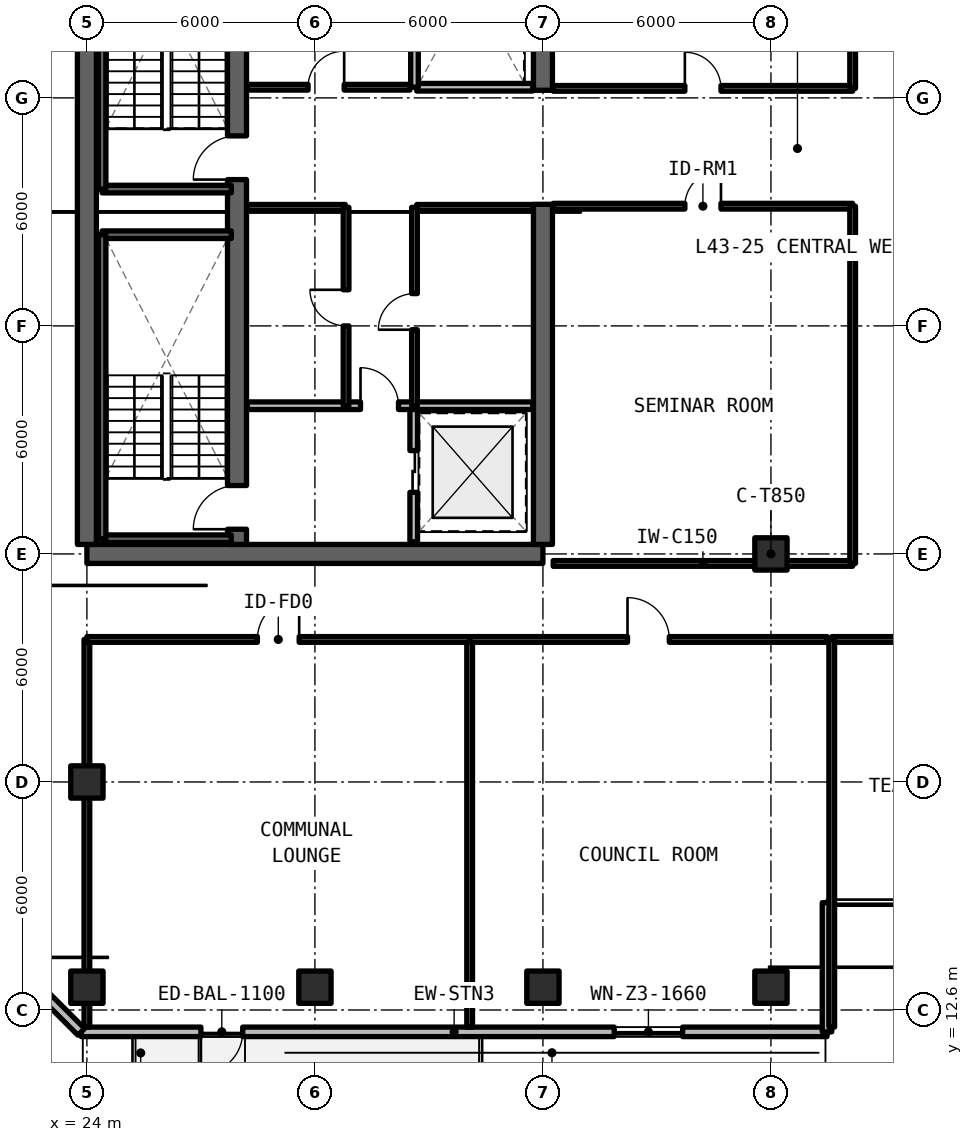
"""IFC4 building model, lengths in metres.
Left out: names, types, materials, properties, quantities, classifications, styles, units other than length and angle.
Written with IfcOpenShell. Run it as: python <this file> out.ifc"""

import sys

from ifc_helpers import new_model, si_unit, direction, frame, frame_2d, origin, origin_2d, place, context, subcontext, project, spatial, rectangle, extrude, element, fill, save


model = new_model("IFC4")
c1 = context("Model", 3, precision=1e-05, world=origin(), true_north=direction((0.0, 1.0)))
c2 = subcontext(c1, "Body", "Model", "MODEL_VIEW")
j1 = project(units=[si_unit("LENGTHUNIT", "METRE"), si_unit("PLANEANGLEUNIT", "RADIAN")], contexts=[c1])
p1 = place(None, origin())
s1 = spatial("IfcSite", under=j1, at=p1, CompositionType="ELEMENT")
p2 = place(p1, origin())
s2 = spatial("IfcBuilding", under=s1, at=p2, CompositionType="ELEMENT")
p3 = place(p2, frame((0.0, 0.0, 155.1)))
s3 = spatial("IfcBuildingStorey", under=s2, at=p3, CompositionType="ELEMENT", Elevation=155.1)
p4 = place(p3, frame((24.0, 24.6, 0.0), z_axis=(0.0, 0.0, 1.0), x_axis=(1.0, 0.0, 0.0)))
e1 = element("IfcWall", 1, at=p4, inside=s3, PredefinedType="SHEAR", context=c2, shape_type="SweptSolid", body=[
    extrude(rectangle(XDim=12.0, YDim=0.5, at=frame_2d((6.0, 0.0))), origin(), (0.0, 0.0, 1.0), 3.3),
])
p5 = place(p3, frame((24.0, 24.85, 0.0), z_axis=(0.0, 0.0, 1.0), x_axis=(0.0, 1.0, 0.0)))
e2 = element("IfcWall", 2, at=p5, inside=s3, PredefinedType="SHEAR", context=c2, shape_type="SweptSolid", body=[
    extrude(rectangle(XDim=17.5, YDim=0.5, at=frame_2d((8.75, 0.0))), origin(), (0.0, 0.0, 1.0), 3.3),
])
p6 = place(p3, frame((36.0, 24.85, 0.0), z_axis=(0.0, 0.0, 1.0), x_axis=(0.0, 1.0, 0.0)))
e3 = element("IfcWall", 3, at=p6, inside=s3, PredefinedType="SHEAR", context=c2, shape_type="SweptSolid", body=[
    extrude(rectangle(XDim=8.95, YDim=0.5, at=frame_2d((4.475, 0.0))), origin(), (0.0, 0.0, 1.0), 3.3),
])
p7 = place(p3, frame((36.0, 36.8, 0.0), z_axis=(0.0, 0.0, 1.0), x_axis=(0.0, 1.0, 0.0)))
e4 = element("IfcWall", 4, at=p7, inside=s3, PredefinedType="SHEAR", context=c2, shape_type="SweptSolid", body=[
    extrude(rectangle(XDim=5.55, YDim=0.5, at=frame_2d((2.775, 0.0))), origin(), (0.0, 0.0, 1.0), 3.3),
])
p8 = place(p3, frame((27.95, 24.85, 0.0), z_axis=(0.0, 0.0, 1.0), x_axis=(0.0, 1.0, 0.0)))
e5 = element("IfcWall", 5, at=p8, inside=s3, PredefinedType="SHEAR", context=c2, shape_type="SweptSolid", body=[
    extrude(rectangle(XDim=17.5, YDim=0.5, at=frame_2d((8.75, 0.0))), origin(), (0.0, 0.0, 1.0), 3.3),
])
p9 = place(p8, frame((0.4, 0.0, 0.0)))
e6 = element("IfcOpeningElement", 6, at=p9, cuts=e5, PredefinedType="OPENING", context=c2, shape_type="SweptSolid", body=[
    extrude(rectangle(XDim=1.15, YDim=2.15, at=frame_2d((0.575, 1.075))), frame((0.0, 0.26, 0.0), z_axis=(0.0, -1.0, 0.0), x_axis=(1.0, 0.0, 0.0)), (0.0, 0.0, 1.0), 0.52),
])
p10 = place(p8, frame((9.6, 0.0, 0.0)))
e7 = element("IfcOpeningElement", 7, at=p10, cuts=e5, PredefinedType="OPENING", context=c2, shape_type="SweptSolid", body=[
    extrude(rectangle(XDim=1.15, YDim=2.15, at=frame_2d((0.575, 1.075))), frame((0.0, 0.26, 0.0), z_axis=(0.0, -1.0, 0.0), x_axis=(1.0, 0.0, 0.0)), (0.0, 0.0, 1.0), 0.52),
])
for number, where, z_axis, x_axis in (
    (8, (42.0, 24.6, 0.0), (0.0, 0.0, 1.0), (1.0, 0.0, 0.0)),
    (9, (24.0, 18.6, 0.0), (0.0, 0.0, 1.0), (1.0, 0.0, 0.0)),
    (10, (24.0, 13.2, 0.0), (0.0, 0.0, 1.0), (1.0, 0.0, 0.0)),
    (11, (30.0, 13.2, 0.0), (0.0, 0.0, 1.0), (1.0, 0.0, 0.0)),
    (12, (36.0, 13.2, 0.0), (0.0, 0.0, 1.0), (1.0, 0.0, 0.0)),
    (13, (42.0, 13.2, 0.0), (0.0, 0.0, 1.0), (1.0, 0.0, 0.0)),
):
    element("IfcColumn", number, at=place(p3, frame(where, z_axis=z_axis, x_axis=x_axis)), inside=s3, PredefinedType="COLUMN", context=c2, shape_type="SweptSolid", body=[
        extrude(rectangle(XDim=0.85, YDim=0.85, at=origin_2d()), origin(), (0.0, 0.0, 1.0), 3.3),
    ])
p11 = place(p3, frame((23.852, 12.025, 0.0), z_axis=(0.0, 0.0, 1.0), x_axis=(1.0, 0.0, 0.0)))
e14 = element("IfcWall", 14, at=p11, inside=s3, PredefinedType="SOLIDWALL", context=c2, shape_type="SweptSolid", body=[
    extrude(rectangle(XDim=19.623, YDim=0.25, at=frame_2d((9.812, 0.0))), origin(), (0.0, 0.0, 1.0), 3.08),
])
p12 = place(p11, frame((3.148, 0.0, 0.0)))
e15 = element("IfcOpeningElement", 15, at=p12, cuts=e14, PredefinedType="OPENING", context=c2, shape_type="SweptSolid", body=[
    extrude(rectangle(XDim=1.1, YDim=2.15, at=frame_2d((0.55, 1.075))), frame((0.0, 0.135, 0.0), z_axis=(0.0, -1.0, 0.0), x_axis=(1.0, 0.0, 0.0)), (0.0, 0.0, 1.0), 0.27),
])
p13 = place(p11, frame((14.024, 0.0, 0.78)))
e16 = element("IfcOpeningElement", 16, at=p13, cuts=e14, PredefinedType="OPENING", context=c2, shape_type="SweptSolid", body=[
    extrude(rectangle(XDim=1.8, YDim=1.66, at=frame_2d((0.9, 0.83))), frame((0.0, 0.135, 0.0), z_axis=(0.0, -1.0, 0.0), x_axis=(1.0, 0.0, 0.0)), (0.0, 0.0, 1.0), 0.27),
])
p14 = place(p3, frame((43.475, 12.025, 0.0), z_axis=(0.0, 0.0, 1.0), x_axis=(0.0, 1.0, 0.0)))
e17 = element("IfcWall", 17, at=p14, inside=s3, PredefinedType="SOLIDWALL", context=c2, shape_type="SweptSolid", body=[
    extrude(rectangle(XDim=3.4, YDim=0.25, at=frame_2d((1.7, 0.0))), origin(), (0.0, 0.0, 1.0), 3.08),
])
p15 = place(p3, frame((19.725, 16.152, 0.0), z_axis=(0.0, 0.0, 1.0), x_axis=(0.70708586489, -0.707127696864, 0.0)))
e18 = element("IfcWall", 18, at=p15, inside=s3, PredefinedType="SOLIDWALL", context=c2, shape_type="SweptSolid", body=[
    extrude(rectangle(XDim=5.836, YDim=0.25, at=frame_2d((2.918, 0.0))), origin(), (0.0, 0.0, 1.0), 3.08),
])
p16 = place(p15, frame((0.898, 0.0, 0.78)))
e19 = element("IfcOpeningElement", 19, at=p16, cuts=e18, PredefinedType="OPENING", context=c2, shape_type="SweptSolid", body=[
    extrude(rectangle(XDim=3.4, YDim=1.66, at=frame_2d((1.7, 0.83))), frame((0.0, 0.135, 0.0), z_axis=(0.0, -1.0, 0.0), x_axis=(1.0, 0.0, 0.0)), (0.0, 0.0, 1.0), 0.27),
])
p17 = place(p3, frame((32.6, 24.92, 0.0), z_axis=(0.0, 0.0, 1.0), x_axis=(0.0, 1.0, 0.0)))
e20 = element("IfcWall", 20, at=p17, inside=s3, PredefinedType="SOLIDWALL", context=c2, shape_type="SweptSolid", body=[
    extrude(rectangle(XDim=3.58, YDim=0.2, at=frame_2d((1.79, 0.0))), origin(), (0.0, 0.0, 1.0), 2.35),
])
p18 = place(p17, frame((1.3, 0.0, 0.0)))
e21 = element("IfcOpeningElement", 21, at=p18, cuts=e20, PredefinedType="OPENING", context=c2, shape_type="SweptSolid", body=[
    extrude(rectangle(XDim=1.1, YDim=2.2, at=frame_2d((0.55, 1.1))), frame((0.0, 0.11, 0.0), z_axis=(0.0, -1.0, 0.0), x_axis=(1.0, 0.0, 0.0)), (0.0, 0.0, 1.0), 0.22),
])
p19 = place(p3, frame((28.22, 28.5, 0.0), z_axis=(0.0, 0.0, 1.0), x_axis=(1.0, 0.0, 0.0)))
e22 = element("IfcWall", 22, at=p19, inside=s3, PredefinedType="SOLIDWALL", context=c2, shape_type="SweptSolid", body=[
    extrude(rectangle(XDim=7.51, YDim=0.2, at=frame_2d((3.755, 0.0))), origin(), (0.0, 0.0, 1.0), 2.35),
])
p20 = place(p19, frame((2.98, 0.0, 0.0)))
e23 = element("IfcOpeningElement", 23, at=p20, cuts=e22, PredefinedType="OPENING", context=c2, shape_type="SweptSolid", body=[
    extrude(rectangle(XDim=1.0, YDim=2.15, at=frame_2d((0.5, 1.075))), frame((0.0, 0.11, 0.0), z_axis=(0.0, -1.0, 0.0), x_axis=(1.0, 0.0, 0.0)), (0.0, 0.0, 1.0), 0.22),
])
p21 = place(p3, frame((28.22, 33.72, 0.0), z_axis=(0.0, 0.0, 1.0), x_axis=(1.0, 0.0, 0.0)))
e24 = element("IfcWall", 24, at=p21, inside=s3, PredefinedType="SOLIDWALL", context=c2, shape_type="SweptSolid", body=[
    extrude(rectangle(XDim=2.58, YDim=0.15, at=frame_2d((1.29, 0.0))), origin(), (0.0, 0.0, 1.0), 2.35),
])
p22 = place(p3, frame((30.82, 28.5, 0.0), z_axis=(0.0, 0.0, 1.0), x_axis=(0.0, 1.0, 0.0)))
e25 = element("IfcWall", 25, at=p22, inside=s3, PredefinedType="SOLIDWALL", context=c2, shape_type="SweptSolid", body=[
    extrude(rectangle(XDim=5.22, YDim=0.15, at=frame_2d((2.61, 0.0))), origin(), (0.0, 0.0, 1.0), 2.35),
])
p23 = place(p22, frame((2.1, 0.0, 0.0)))
e26 = element("IfcOpeningElement", 26, at=p23, cuts=e25, PredefinedType="OPENING", context=c2, shape_type="SweptSolid", body=[
    extrude(rectangle(XDim=0.95, YDim=2.15, at=frame_2d((0.475, 1.075))), frame((0.0, 0.085, 0.0), z_axis=(0.0, -1.0, 0.0), x_axis=(1.0, 0.0, 0.0)), (0.0, 0.0, 1.0), 0.17),
])
p24 = place(p3, frame((32.68, 33.72, 0.0), z_axis=(0.0, 0.0, 1.0), x_axis=(1.0, 0.0, 0.0)))
e27 = element("IfcWall", 27, at=p24, inside=s3, PredefinedType="SOLIDWALL", context=c2, shape_type="SweptSolid", body=[
    extrude(rectangle(XDim=3.05, YDim=0.15, at=frame_2d((1.525, 0.0))), origin(), (0.0, 0.0, 1.0), 2.35),
])
p25 = place(p3, frame((32.62, 28.5, 0.0), z_axis=(0.0, 0.0, 1.0), x_axis=(0.0, 1.0, 0.0)))
e28 = element("IfcWall", 28, at=p25, inside=s3, PredefinedType="SOLIDWALL", context=c2, shape_type="SweptSolid", body=[
    extrude(rectangle(XDim=5.22, YDim=0.15, at=frame_2d((2.61, 0.0))), origin(), (0.0, 0.0, 1.0), 2.35),
])
p26 = place(p25, frame((2.0, 0.0, 0.0)))
e29 = element("IfcOpeningElement", 29, at=p26, cuts=e28, PredefinedType="OPENING", context=c2, shape_type="SweptSolid", body=[
    extrude(rectangle(XDim=0.95, YDim=2.15, at=frame_2d((0.475, 1.075))), frame((0.0, 0.085, 0.0), z_axis=(0.0, -1.0, 0.0), x_axis=(1.0, 0.0, 0.0)), (0.0, 0.0, 1.0), 0.17),
])
p27 = place(p3, frame((28.22, 36.88, 0.0), z_axis=(0.0, 0.0, 1.0), x_axis=(1.0, 0.0, 0.0)))
e30 = element("IfcWall", 30, at=p27, inside=s3, PredefinedType="SOLIDWALL", context=c2, shape_type="SweptSolid", body=[
    extrude(rectangle(XDim=4.28, YDim=0.15, at=frame_2d((2.14, 0.0))), origin(), (0.0, 0.0, 1.0), 2.35),
])
p28 = place(p27, frame((1.6, 0.0, 0.0)))
e31 = element("IfcOpeningElement", 31, at=p28, cuts=e30, PredefinedType="OPENING", context=c2, shape_type="SweptSolid", body=[
    extrude(rectangle(XDim=0.95, YDim=2.15, at=frame_2d((0.475, 1.075))), frame((0.0, 0.085, 0.0), z_axis=(0.0, -1.0, 0.0), x_axis=(1.0, 0.0, 0.0)), (0.0, 0.0, 1.0), 0.17),
])
p29 = place(p3, frame((32.68, 36.88, 0.0), z_axis=(0.0, 0.0, 1.0), x_axis=(1.0, 0.0, 0.0)))
e32 = element("IfcWall", 32, at=p29, inside=s3, PredefinedType="SOLIDWALL", context=c2, shape_type="SweptSolid", body=[
    extrude(rectangle(XDim=3.05, YDim=0.2, at=frame_2d((1.525, 0.0))), origin(), (0.0, 0.0, 1.0), 2.35),
])
p30 = place(p3, frame((32.62, 36.88, 0.0), z_axis=(0.0, 0.0, 1.0), x_axis=(0.0, 1.0, 0.0)))
e33 = element("IfcWall", 33, at=p30, inside=s3, PredefinedType="SOLIDWALL", context=c2, shape_type="SweptSolid", body=[
    extrude(rectangle(XDim=5.42, YDim=0.2, at=frame_2d((2.71, 0.0))), origin(), (0.0, 0.0, 1.0), 2.35),
])
p31 = place(p3, frame((36.27, 24.35, 0.0), z_axis=(0.0, 0.0, 1.0), x_axis=(1.0, 0.0, 0.0)))
e34 = element("IfcWall", 34, at=p31, inside=s3, PredefinedType="SOLIDWALL", context=c2, shape_type="SweptSolid", body=[
    extrude(rectangle(XDim=7.88, YDim=0.15, at=frame_2d((3.94, 0.0))), origin(), (0.0, 0.0, 1.0), 2.35),
])
p32 = place(p3, frame((36.27, 33.75, 0.0), z_axis=(0.0, 0.0, 1.0), x_axis=(1.0, 0.0, 0.0)))
e35 = element("IfcWall", 35, at=p32, inside=s3, PredefinedType="SOLIDWALL", context=c2, shape_type="SweptSolid", body=[
    extrude(rectangle(XDim=7.88, YDim=0.15, at=frame_2d((3.94, 0.0))), origin(), (0.0, 0.0, 1.0), 2.35),
])
p33 = place(p32, frame((3.465, 0.0, 0.0)))
e36 = element("IfcOpeningElement", 36, at=p33, cuts=e35, PredefinedType="OPENING", context=c2, shape_type="SweptSolid", body=[
    extrude(rectangle(XDim=0.95, YDim=2.15, at=frame_2d((0.475, 1.075))), frame((0.0, 0.085, 0.0), z_axis=(0.0, -1.0, 0.0), x_axis=(1.0, 0.0, 0.0)), (0.0, 0.0, 1.0), 0.17),
])
p34 = place(p3, frame((44.15, 24.35, 0.0), z_axis=(0.0, 0.0, 1.0), x_axis=(0.0, 1.0, 0.0)))
e37 = element("IfcWall", 37, at=p34, inside=s3, PredefinedType="SOLIDWALL", context=c2, shape_type="SweptSolid", body=[
    extrude(rectangle(XDim=9.4, YDim=0.15, at=frame_2d((4.7, 0.0))), origin(), (0.0, 0.0, 1.0), 2.35),
])
p35 = place(p3, frame((36.27, 36.85, 0.0), z_axis=(0.0, 0.0, 1.0), x_axis=(1.0, 0.0, 0.0)))
e38 = element("IfcWall", 38, at=p35, inside=s3, PredefinedType="SOLIDWALL", context=c2, shape_type="SweptSolid", body=[
    extrude(rectangle(XDim=7.88, YDim=0.15, at=frame_2d((3.94, 0.0))), origin(), (0.0, 0.0, 1.0), 2.35),
])
p36 = place(p35, frame((3.465, 0.0, 0.0)))
e39 = element("IfcOpeningElement", 39, at=p36, cuts=e38, PredefinedType="OPENING", context=c2, shape_type="SweptSolid", body=[
    extrude(rectangle(XDim=0.95, YDim=2.15, at=frame_2d((0.475, 1.075))), frame((0.0, 0.085, 0.0), z_axis=(0.0, -1.0, 0.0), x_axis=(1.0, 0.0, 0.0)), (0.0, 0.0, 1.0), 0.17),
])
p37 = place(p3, frame((44.15, 36.85, 0.0), z_axis=(0.0, 0.0, 1.0), x_axis=(0.0, 1.0, 0.0)))
e40 = element("IfcWall", 40, at=p37, inside=s3, PredefinedType="SOLIDWALL", context=c2, shape_type="SweptSolid", body=[
    extrude(rectangle(XDim=6.0, YDim=0.15, at=frame_2d((3.0, 0.0))), origin(), (0.0, 0.0, 1.0), 2.35),
])
p38 = place(p3, frame((43.6, 22.35, 0.0), z_axis=(0.0, 0.0, 1.0), x_axis=(1.0, 0.0, 0.0)))
e41 = element("IfcWall", 41, at=p38, inside=s3, PredefinedType="SOLIDWALL", context=c2, shape_type="SweptSolid", body=[
    extrude(rectangle(XDim=8.4, YDim=0.15, at=frame_2d((4.2, 0.0))), origin(), (0.0, 0.0, 1.0), 2.35),
])
p39 = place(p38, frame((3.65, 0.0, 0.0)))
e42 = element("IfcOpeningElement", 42, at=p39, cuts=e41, PredefinedType="OPENING", context=c2, shape_type="SweptSolid", body=[
    extrude(rectangle(XDim=1.1, YDim=2.15, at=frame_2d((0.55, 1.075))), frame((0.0, 0.085, 0.0), z_axis=(0.0, -1.0, 0.0), x_axis=(1.0, 0.0, 0.0)), (0.0, 0.0, 1.0), 0.17),
])
for number, where, z_axis, x_axis in (
    (43, (43.6, 12.15, 0.0), (0.0, 0.0, 1.0), (0.0, 1.0, 0.0)),
    (44, (24.0, 12.15, 0.0), (0.0, 0.0, 1.0), (0.0, 1.0, 0.0)),
    (45, (34.072, 12.15, 0.0), (0.0, 0.0, 1.0), (0.0, 1.0, 0.0)),
):
    element("IfcWall", number, at=place(p3, frame(where, z_axis=z_axis, x_axis=x_axis)), inside=s3, PredefinedType="SOLIDWALL", context=c2, shape_type="SweptSolid", body=[
        extrude(rectangle(XDim=10.2, YDim=0.15, at=frame_2d((5.1, 0.0))), origin(), (0.0, 0.0, 1.0), 2.35),
    ])
p40 = place(p3, frame((24.0, 22.35, 0.0), z_axis=(0.0, 0.0, 1.0), x_axis=(1.0, 0.0, 0.0)))
e46 = element("IfcWall", 46, at=p40, inside=s3, PredefinedType="SOLIDWALL", context=c2, shape_type="SweptSolid", body=[
    extrude(rectangle(XDim=10.072, YDim=0.15, at=frame_2d((5.036, 0.0))), origin(), (0.0, 0.0, 1.0), 2.35),
])
p41 = place(p40, frame((4.486, 0.0, 0.0)))
e47 = element("IfcOpeningElement", 47, at=p41, cuts=e46, PredefinedType="OPENING", context=c2, shape_type="SweptSolid", body=[
    extrude(rectangle(XDim=1.1, YDim=2.15, at=frame_2d((0.55, 1.075))), frame((0.0, 0.085, 0.0), z_axis=(0.0, -1.0, 0.0), x_axis=(1.0, 0.0, 0.0)), (0.0, 0.0, 1.0), 0.17),
])
p42 = place(p3, frame((34.072, 22.35, 0.0), z_axis=(0.0, 0.0, 1.0), x_axis=(1.0, 0.0, 0.0)))
e48 = element("IfcWall", 48, at=p42, inside=s3, PredefinedType="SOLIDWALL", context=c2, shape_type="SweptSolid", body=[
    extrude(rectangle(XDim=9.408, YDim=0.15, at=frame_2d((4.704, 0.0))), origin(), (0.0, 0.0, 1.0), 2.35),
])
p43 = place(p42, frame((4.154, 0.0, 0.0)))
e49 = element("IfcOpeningElement", 49, at=p43, cuts=e48, PredefinedType="OPENING", context=c2, shape_type="SweptSolid", body=[
    extrude(rectangle(XDim=1.1, YDim=2.15, at=frame_2d((0.55, 1.075))), frame((0.0, 0.085, 0.0), z_axis=(0.0, -1.0, 0.0), x_axis=(1.0, 0.0, 0.0)), (0.0, 0.0, 1.0), 0.17),
])
for number, where, z_axis, x_axis in (
    (50, (24.4, 25.0, 0.0), (0.0, 0.0, 1.0), (1.0, 0.0, 0.0)),
    (51, (27.8, 33.0, 0.0), (0.0, 0.0, 1.0), (-1.0, 0.0, 0.0)),
):
    element("IfcWall", number, at=place(p3, frame(where, z_axis=z_axis, x_axis=x_axis)), inside=s3, PredefinedType="SOLIDWALL", context=c2, shape_type="SweptSolid", body=[
        extrude(rectangle(XDim=3.4, YDim=0.2, at=frame_2d((1.7, 0.0))), origin(), (0.0, 0.0, 1.0), 3.3),
    ])
p44 = place(p3, frame((24.4, 33.0, 0.0), z_axis=(0.0, 0.0, 1.0), x_axis=(0.0, -1.0, 0.0)))
e52 = element("IfcWall", 52, at=p44, inside=s3, PredefinedType="SOLIDWALL", context=c2, shape_type="SweptSolid", body=[
    extrude(rectangle(XDim=8.0, YDim=0.2, at=frame_2d((4.0, 0.0))), origin(), (0.0, 0.0, 1.0), 3.3),
])
p45 = place(p3, frame((24.4, 34.2, 0.0), z_axis=(0.0, 0.0, 1.0), x_axis=(1.0, 0.0, 0.0)))
e53 = element("IfcWall", 53, at=p45, inside=s3, PredefinedType="SOLIDWALL", context=c2, shape_type="SweptSolid", body=[
    extrude(rectangle(XDim=3.4, YDim=0.2, at=frame_2d((1.7, 0.0))), origin(), (0.0, 0.0, 1.0), 3.3),
])
p46 = place(p3, frame((24.4, 42.2, 0.0), z_axis=(0.0, 0.0, 1.0), x_axis=(0.0, -1.0, 0.0)))
e54 = element("IfcWall", 54, at=p46, inside=s3, PredefinedType="SOLIDWALL", context=c2, shape_type="SweptSolid", body=[
    extrude(rectangle(XDim=8.0, YDim=0.2, at=frame_2d((4.0, 0.0))), origin(), (0.0, 0.0, 1.0), 3.3),
])
p47 = place(p12, frame((1.1, 0.0, 0.0), z_axis=(0.0, 0.0, 1.0), x_axis=(-1.0, 0.0, 0.0)))
e55 = element("IfcDoor", 55, at=p47, inside=s3, OperationType="SINGLE_SWING_RIGHT", PredefinedType="DOOR", context=c2, shape_type="SweptSolid", body=[
    extrude(rectangle(XDim=1.1, YDim=2.15, at=frame_2d((0.55, 1.075))), frame((0.0, 0.025, 0.0), z_axis=(0.0, -1.0, 0.0), x_axis=(1.0, 0.0, 0.0)), (0.0, 0.0, 1.0), 0.05),
])
fill(e15, e55)
p48 = place(p13, origin())
e56 = element("IfcWindow", 56, at=p48, inside=s3, PartitioningType="SINGLE_PANEL", PredefinedType="WINDOW", context=c2, shape_type="SweptSolid", body=[
    extrude(rectangle(XDim=1.8, YDim=1.66, at=frame_2d((0.9, 0.83))), frame((0.0, 0.03, 0.0), z_axis=(0.0, -1.0, 0.0), x_axis=(1.0, 0.0, 0.0)), (0.0, 0.0, 1.0), 0.06),
])
fill(e16, e56)
p49 = place(p18, origin())
e57 = element("IfcDoor", 57, at=p49, inside=s3, OperationType="SLIDING_TO_LEFT", PredefinedType="DOOR", context=c2, shape_type="SweptSolid", body=[
    extrude(rectangle(XDim=1.1, YDim=2.2, at=frame_2d((0.55, 1.1))), frame((0.0, 0.025, 0.0), z_axis=(0.0, -1.0, 0.0), x_axis=(1.0, 0.0, 0.0)), (0.0, 0.0, 1.0), 0.05),
])
fill(e21, e57)
p50 = place(p20, origin())
e58 = element("IfcDoor", 58, at=p50, inside=s3, OperationType="SINGLE_SWING_LEFT", PredefinedType="DOOR", context=c2, shape_type="SweptSolid", body=[
    extrude(rectangle(XDim=1.0, YDim=2.15, at=frame_2d((0.5, 1.075))), frame((0.0, 0.025, 0.0), z_axis=(0.0, -1.0, 0.0), x_axis=(1.0, 0.0, 0.0)), (0.0, 0.0, 1.0), 0.05),
])
fill(e23, e58)
p51 = place(p23, origin())
e59 = element("IfcDoor", 59, at=p51, inside=s3, OperationType="SINGLE_SWING_RIGHT", PredefinedType="DOOR", context=c2, shape_type="SweptSolid", body=[
    extrude(rectangle(XDim=0.95, YDim=2.15, at=frame_2d((0.475, 1.075))), frame((0.0, 0.025, 0.0), z_axis=(0.0, -1.0, 0.0), x_axis=(1.0, 0.0, 0.0)), (0.0, 0.0, 1.0), 0.05),
])
fill(e26, e59)
p52 = place(p26, origin())
e60 = element("IfcDoor", 60, at=p52, inside=s3, OperationType="SINGLE_SWING_LEFT", PredefinedType="DOOR", context=c2, shape_type="SweptSolid", body=[
    extrude(rectangle(XDim=0.95, YDim=2.15, at=frame_2d((0.475, 1.075))), frame((0.0, 0.025, 0.0), z_axis=(0.0, -1.0, 0.0), x_axis=(1.0, 0.0, 0.0)), (0.0, 0.0, 1.0), 0.05),
])
fill(e29, e60)
p53 = place(p28, origin())
e61 = element("IfcDoor", 61, at=p53, inside=s3, OperationType="SINGLE_SWING_RIGHT", PredefinedType="DOOR", context=c2, shape_type="SweptSolid", body=[
    extrude(rectangle(XDim=0.95, YDim=2.15, at=frame_2d((0.475, 1.075))), frame((0.0, 0.025, 0.0), z_axis=(0.0, -1.0, 0.0), x_axis=(1.0, 0.0, 0.0)), (0.0, 0.0, 1.0), 0.05),
])
fill(e31, e61)
p54 = place(p33, origin())
e62 = element("IfcDoor", 62, at=p54, inside=s3, OperationType="SINGLE_SWING_RIGHT", PredefinedType="DOOR", context=c2, shape_type="SweptSolid", body=[
    extrude(rectangle(XDim=0.95, YDim=2.15, at=frame_2d((0.475, 1.075))), frame((0.0, 0.025, 0.0), z_axis=(0.0, -1.0, 0.0), x_axis=(1.0, 0.0, 0.0)), (0.0, 0.0, 1.0), 0.05),
])
fill(e36, e62)
p55 = place(p36, origin())
e63 = element("IfcDoor", 63, at=p55, inside=s3, OperationType="SINGLE_SWING_LEFT", PredefinedType="DOOR", context=c2, shape_type="SweptSolid", body=[
    extrude(rectangle(XDim=0.95, YDim=2.15, at=frame_2d((0.475, 1.075))), frame((0.0, 0.025, 0.0), z_axis=(0.0, -1.0, 0.0), x_axis=(1.0, 0.0, 0.0)), (0.0, 0.0, 1.0), 0.05),
])
fill(e39, e63)
p56 = place(p41, origin())
e64 = element("IfcDoor", 64, at=p56, inside=s3, OperationType="SINGLE_SWING_RIGHT", PredefinedType="DOOR", context=c2, shape_type="SweptSolid", body=[
    extrude(rectangle(XDim=1.1, YDim=2.15, at=frame_2d((0.55, 1.075))), frame((0.0, 0.025, 0.0), z_axis=(0.0, -1.0, 0.0), x_axis=(1.0, 0.0, 0.0)), (0.0, 0.0, 1.0), 0.05),
])
fill(e47, e64)
p57 = place(p43, origin())
e65 = element("IfcDoor", 65, at=p57, inside=s3, OperationType="SINGLE_SWING_LEFT", PredefinedType="DOOR", context=c2, shape_type="SweptSolid", body=[
    extrude(rectangle(XDim=1.1, YDim=2.15, at=frame_2d((0.55, 1.075))), frame((0.0, 0.025, 0.0), z_axis=(0.0, -1.0, 0.0), x_axis=(1.0, 0.0, 0.0)), (0.0, 0.0, 1.0), 0.05),
])
fill(e49, e65)
p58 = place(p9, origin())
e66 = element("IfcDoor", 66, at=p58, inside=s3, OperationType="SINGLE_SWING_RIGHT", PredefinedType="DOOR", context=c2, shape_type="SweptSolid", body=[
    extrude(rectangle(XDim=1.15, YDim=2.15, at=frame_2d((0.575, 1.075))), frame((0.0, 0.025, 0.0), z_axis=(0.0, -1.0, 0.0), x_axis=(1.0, 0.0, 0.0)), (0.0, 0.0, 1.0), 0.05),
])
fill(e6, e66)
p59 = place(p10, origin())
e67 = element("IfcDoor", 67, at=p59, inside=s3, OperationType="SINGLE_SWING_LEFT", PredefinedType="DOOR", context=c2, shape_type="SweptSolid", body=[
    extrude(rectangle(XDim=1.15, YDim=2.15, at=frame_2d((0.575, 1.075))), frame((0.0, 0.025, 0.0), z_axis=(0.0, -1.0, 0.0), x_axis=(1.0, 0.0, 0.0)), (0.0, 0.0, 1.0), 0.05),
])
fill(e7, e67)
save(model, sys.argv[1])
